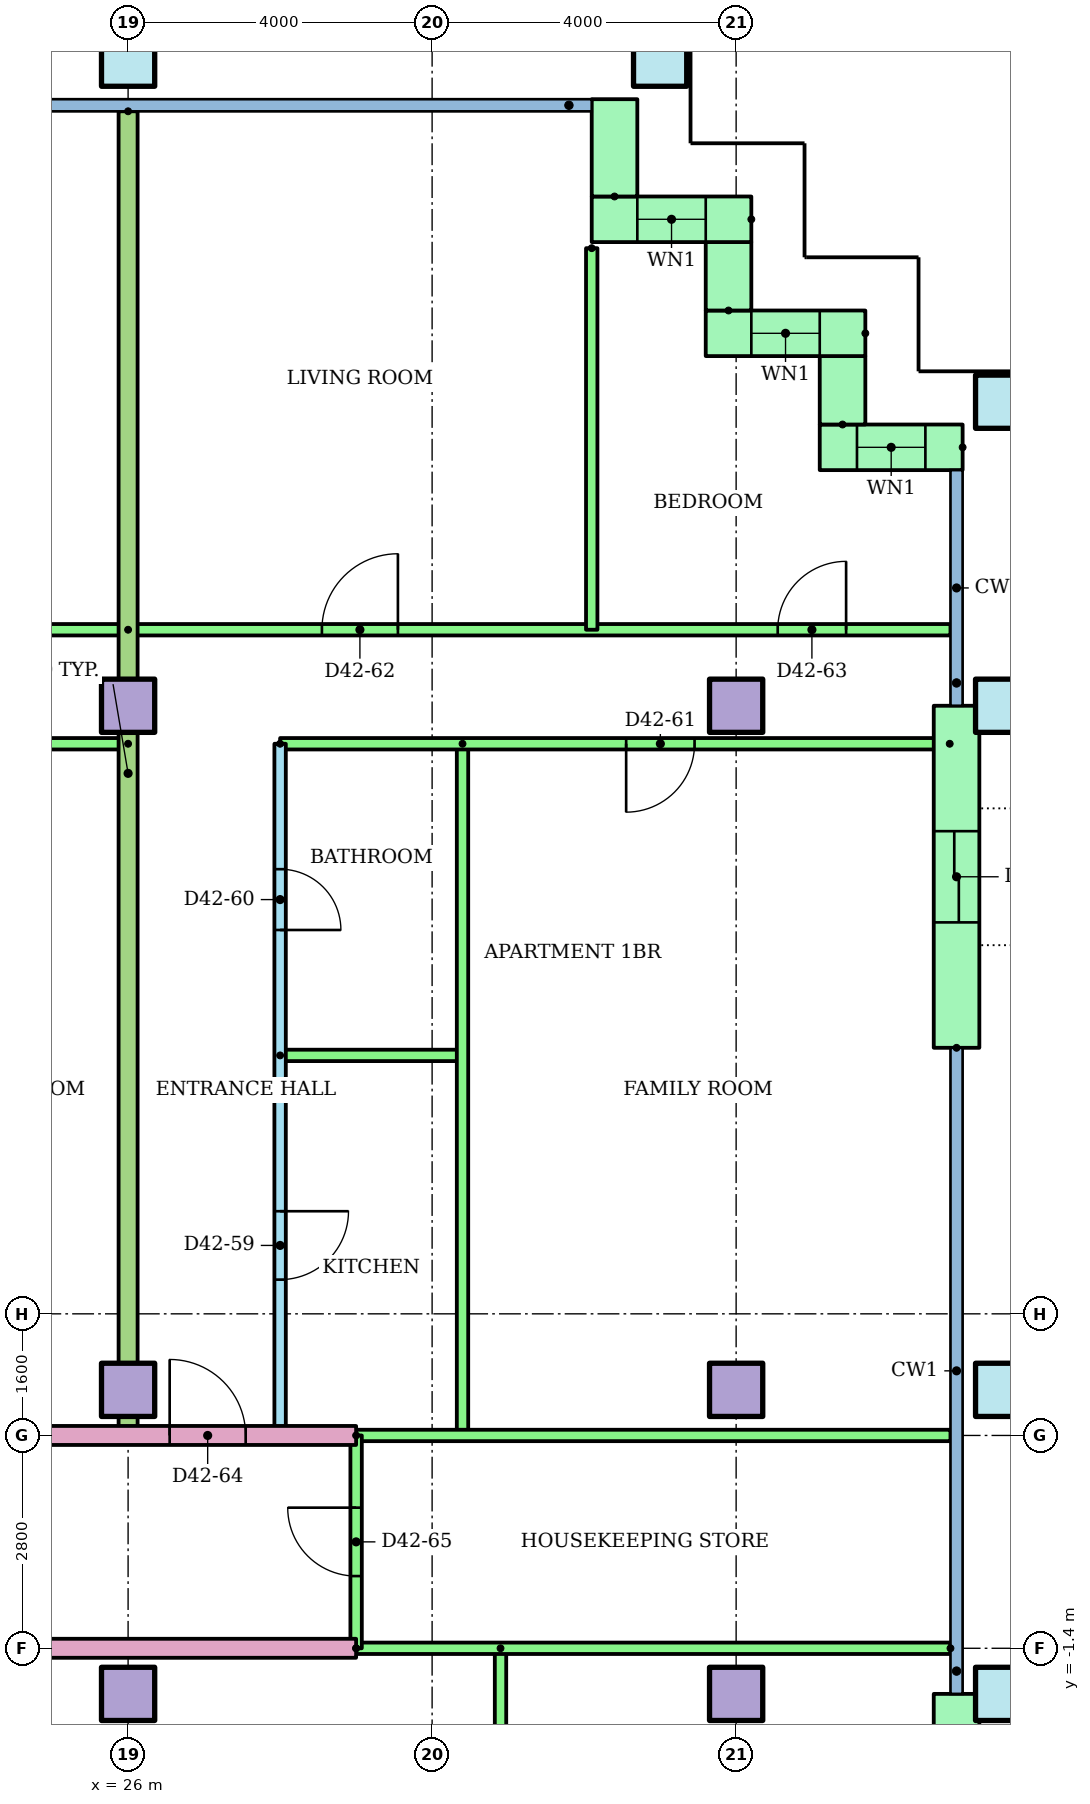
"""IFC4 building model, lengths in metres.
Left out: names, types, materials, properties, quantities, classifications, styles, units other than length and angle.
Written with IfcOpenShell. Run it as: python <this file> out.ifc"""

import sys

from ifc_helpers import new_model, si_unit, direction, frame, frame_2d, origin, origin_2d, place, context, subcontext, project, spatial, rectangle, hollow_rectangle, extrude, element, fill, save


model = new_model("IFC4")
c1 = context("Model", 3, precision=1e-05, world=origin(), true_north=direction((0.0, 1.0)))
c2 = subcontext(c1, "Body", "Model", "MODEL_VIEW")
j1 = project(units=[si_unit("LENGTHUNIT", "METRE"), si_unit("PLANEANGLEUNIT", "RADIAN")], contexts=[c1])
p1 = place(None, origin())
s1 = spatial("IfcSite", under=j1, at=p1, CompositionType="ELEMENT")
p2 = place(p1, origin())
s2 = spatial("IfcBuilding", under=s1, at=p2, CompositionType="ELEMENT")
p3 = place(p2, frame((0.0, 0.0, 165.3)))
s3 = spatial("IfcBuildingStorey", under=s2, at=p3, CompositionType="ELEMENT", Elevation=165.3)
for number, where in (
    (1, (26.0, -2.0, 0.0)),
    (2, (34.0, -2.0, 0.0)),
):
    element("IfcColumn", number, at=place(p3, frame(where)), inside=s3, PredefinedType="COLUMN", context=c2, shape_type="SweptSolid", body=[
        extrude(rectangle(XDim=0.7, YDim=0.7, at=origin_2d()), origin(), (0.0, 0.0, 1.0), 3.2),
    ])
p4 = place(p3, frame((37.5, -2.0, 0.0)))
e3 = element("IfcColumn", 3, at=p4, inside=s3, PredefinedType="COLUMN", context=c2, shape_type="SweptSolid", body=[
    extrude(hollow_rectangle(XDim=0.7, YDim=0.7, WallThickness=0.036, at=origin_2d()), origin(), (0.0, 0.0, 1.0), 3.2),
])
for number, where in (
    (4, (26.0, 2.0, 0.0)),
    (5, (34.0, 2.0, 0.0)),
):
    element("IfcColumn", number, at=place(p3, frame(where)), inside=s3, PredefinedType="COLUMN", context=c2, shape_type="SweptSolid", body=[
        extrude(rectangle(XDim=0.7, YDim=0.7, at=origin_2d()), origin(), (0.0, 0.0, 1.0), 3.2),
    ])
p5 = place(p3, frame((37.5, 2.0, 0.0)))
e6 = element("IfcColumn", 6, at=p5, inside=s3, PredefinedType="COLUMN", context=c2, shape_type="SweptSolid", body=[
    extrude(hollow_rectangle(XDim=0.7, YDim=0.7, WallThickness=0.036, at=origin_2d()), origin(), (0.0, 0.0, 1.0), 3.2),
])
for number, where in (
    (7, (26.0, 11.0, 0.0)),
    (8, (34.0, 11.0, 0.0)),
):
    element("IfcColumn", number, at=place(p3, frame(where)), inside=s3, PredefinedType="COLUMN", context=c2, shape_type="SweptSolid", body=[
        extrude(rectangle(XDim=0.7, YDim=0.7, at=origin_2d()), origin(), (0.0, 0.0, 1.0), 3.2),
    ])
for number, where in (
    (9, (37.5, 11.0, 0.0)),
    (10, (37.5, 15.0, 0.0)),
    (11, (26.0, 19.5, 0.0)),
    (12, (33.0, 19.5, 0.0)),
):
    element("IfcColumn", number, at=place(p3, frame(where)), inside=s3, PredefinedType="COLUMN", context=c2, shape_type="SweptSolid", body=[
        extrude(hollow_rectangle(XDim=0.7, YDim=0.7, WallThickness=0.036, at=origin_2d()), origin(), (0.0, 0.0, 1.0), 3.2),
    ])
p6 = place(p3, frame((36.98, 14.4, 0.0), z_axis=(0.0, 0.0, 1.0), x_axis=(-1.0, 0.0, 0.0)))
e13 = element("IfcWall", 13, at=p6, inside=s3, PredefinedType="STANDARD", context=c2, shape_type="SweptSolid", body=[
    extrude(rectangle(XDim=1.88, YDim=0.6, at=frame_2d((0.94, 0.0))), origin(), (0.0, 0.0, 1.0), 2.92),
])
p7 = place(p6, frame((0.49, 0.0, 0.9)))
e14 = element("IfcOpeningElement", 14, at=p7, cuts=e13, PredefinedType="OPENING", context=c2, shape_type="SweptSolid", body=[
    extrude(rectangle(XDim=0.9, YDim=1.5, at=frame_2d((0.45, 0.75))), frame((0.0, 0.31, 0.0), z_axis=(0.0, -1.0, 0.0), x_axis=(1.0, 0.0, 0.0)), (0.0, 0.0, 1.0), 0.62),
])
p8 = place(p3, frame((35.4, 14.7, 0.0), z_axis=(0.0, 0.0, 1.0), x_axis=(0.0, 1.0, 0.0)))
e15 = element("IfcWall", 15, at=p8, inside=s3, PredefinedType="STANDARD", context=c2, shape_type="SweptSolid", body=[
    extrude(rectangle(XDim=0.9, YDim=0.6, at=frame_2d((0.45, 0.0))), origin(), (0.0, 0.0, 1.0), 2.92),
])
p9 = place(p3, frame((35.7, 15.9, 0.0), z_axis=(0.0, 0.0, 1.0), x_axis=(-1.0, 0.0, 0.0)))
e16 = element("IfcWall", 16, at=p9, inside=s3, PredefinedType="STANDARD", context=c2, shape_type="SweptSolid", body=[
    extrude(rectangle(XDim=2.1, YDim=0.6, at=frame_2d((1.05, 0.0))), origin(), (0.0, 0.0, 1.0), 2.92),
])
p10 = place(p9, frame((0.6, 0.0, 0.9)))
e17 = element("IfcOpeningElement", 17, at=p10, cuts=e16, PredefinedType="OPENING", context=c2, shape_type="SweptSolid", body=[
    extrude(rectangle(XDim=0.9, YDim=1.5, at=frame_2d((0.45, 0.75))), frame((0.0, 0.31, 0.0), z_axis=(0.0, -1.0, 0.0), x_axis=(1.0, 0.0, 0.0)), (0.0, 0.0, 1.0), 0.62),
])
p11 = place(p3, frame((33.9, 16.2, 0.0), z_axis=(0.0, 0.0, 1.0), x_axis=(0.0, 1.0, 0.0)))
e18 = element("IfcWall", 18, at=p11, inside=s3, PredefinedType="STANDARD", context=c2, shape_type="SweptSolid", body=[
    extrude(rectangle(XDim=0.9, YDim=0.6, at=frame_2d((0.45, 0.0))), origin(), (0.0, 0.0, 1.0), 2.92),
])
p12 = place(p3, frame((34.2, 17.4, 0.0), z_axis=(0.0, 0.0, 1.0), x_axis=(-1.0, 0.0, 0.0)))
e19 = element("IfcWall", 19, at=p12, inside=s3, PredefinedType="STANDARD", context=c2, shape_type="SweptSolid", body=[
    extrude(rectangle(XDim=2.1, YDim=0.6, at=frame_2d((1.05, 0.0))), origin(), (0.0, 0.0, 1.0), 2.92),
])
p13 = place(p12, frame((0.6, 0.0, 0.9)))
e20 = element("IfcOpeningElement", 20, at=p13, cuts=e19, PredefinedType="OPENING", context=c2, shape_type="SweptSolid", body=[
    extrude(rectangle(XDim=0.9, YDim=1.5, at=frame_2d((0.45, 0.75))), frame((0.0, 0.31, 0.0), z_axis=(0.0, -1.0, 0.0), x_axis=(1.0, 0.0, 0.0)), (0.0, 0.0, 1.0), 0.62),
])
p14 = place(p3, frame((32.4, 17.7, 0.0), z_axis=(0.0, 0.0, 1.0), x_axis=(0.0, 1.0, 0.0)))
e21 = element("IfcWall", 21, at=p14, inside=s3, PredefinedType="STANDARD", context=c2, shape_type="SweptSolid", body=[
    extrude(rectangle(XDim=1.28, YDim=0.6, at=frame_2d((0.64, 0.0))), origin(), (0.0, 0.0, 1.0), 2.92),
])
p15 = place(p3, frame((36.9, -5.7, 0.0), z_axis=(0.0, 0.0, 1.0), x_axis=(0.0, 1.0, 0.0)))
e22 = element("IfcWall", 22, at=p15, inside=s3, PredefinedType="STANDARD", context=c2, shape_type="SweptSolid", body=[
    extrude(rectangle(XDim=3.7, YDim=0.6, at=frame_2d((1.85, 0.0))), origin(), (0.0, 0.0, 1.0), 2.92),
])
p16 = place(p15, frame((1.25, 0.0, 0.0)))
e23 = element("IfcOpeningElement", 23, at=p16, cuts=e22, PredefinedType="OPENING", context=c2, shape_type="SweptSolid", body=[
    extrude(rectangle(XDim=1.2, YDim=2.1, at=frame_2d((0.6, 1.05))), frame((0.0, 0.31, 0.0), z_axis=(0.0, -1.0, 0.0), x_axis=(1.0, 0.0, 0.0)), (0.0, 0.0, 1.0), 0.62),
])
p17 = place(p3, frame((36.9, 6.5, 0.0), z_axis=(0.0, 0.0, 1.0), x_axis=(0.0, 1.0, 0.0)))
e24 = element("IfcWall", 24, at=p17, inside=s3, PredefinedType="STANDARD", context=c2, shape_type="SweptSolid", body=[
    extrude(rectangle(XDim=4.5, YDim=0.6, at=frame_2d((2.25, 0.0))), origin(), (0.0, 0.0, 1.0), 2.92),
])
p18 = place(p17, frame((1.65, 0.0, 0.0)))
e25 = element("IfcOpeningElement", 25, at=p18, cuts=e24, PredefinedType="OPENING", context=c2, shape_type="SweptSolid", body=[
    extrude(rectangle(XDim=1.2, YDim=2.1, at=frame_2d((0.6, 1.05))), frame((0.0, 0.31, 0.0), z_axis=(0.0, -1.0, 0.0), x_axis=(1.0, 0.0, 0.0)), (0.0, 0.0, 1.0), 0.62),
])
p19 = place(p3, frame((30.9, -1.4, 0.0), z_axis=(0.0, 0.0, 1.0), x_axis=(0.0, -1.0, 0.0)))
e26 = element("IfcWall", 26, at=p19, inside=s3, PredefinedType="PARTITIONING", context=c2, shape_type="SweptSolid", body=[
    extrude(rectangle(XDim=6.7, YDim=0.15, at=frame_2d((3.35, 0.0))), origin(), (0.0, 0.0, 1.0), 2.4),
])
p20 = place(p3, frame((29.0, -1.4, 0.0), z_axis=(0.0, 0.0, 1.0), x_axis=(-1.0, 0.0, 0.0)))
e27 = element("IfcWall", 27, at=p20, inside=s3, PredefinedType="PARTITIONING", context=c2, shape_type="SweptSolid", body=[
    extrude(rectangle(XDim=15.0, YDim=0.25, at=frame_2d((7.5, 0.0))), origin(), (0.0, 0.0, 1.0), 2.4),
])
p21 = place(p3, frame((36.82, -1.4, 0.0), z_axis=(0.0, 0.0, 1.0), x_axis=(-1.0, 0.0, 0.0)))
e28 = element("IfcWall", 28, at=p21, inside=s3, PredefinedType="PARTITIONING", context=c2, shape_type="SweptSolid", body=[
    extrude(rectangle(XDim=7.82, YDim=0.15, at=frame_2d((3.91, 0.0))), origin(), (0.0, 0.0, 1.0), 2.4),
])
p22 = place(p3, frame((26.0, 10.5, 0.0), z_axis=(0.0, 0.0, 1.0), x_axis=(-1.0, 0.0, 0.0)))
e29 = element("IfcWall", 29, at=p22, inside=s3, PredefinedType="PARTITIONING", context=c2, shape_type="SweptSolid", body=[
    extrude(rectangle(XDim=10.0, YDim=0.15, at=frame_2d((5.0, 0.0))), origin(), (0.0, 0.0, 1.0), 2.4),
])
p23 = place(p22, frame((4.9, 0.0, 0.0)))
e30 = element("IfcOpeningElement", 30, at=p23, cuts=e29, PredefinedType="OPENING", context=c2, shape_type="SweptSolid", body=[
    extrude(rectangle(XDim=0.9, YDim=2.1, at=frame_2d((0.45, 1.05))), frame((0.0, 0.085, 0.0), z_axis=(0.0, -1.0, 0.0), x_axis=(1.0, 0.0, 0.0)), (0.0, 0.0, 1.0), 0.17),
])
p24 = place(p22, frame((1.1, 0.0, 0.0)))
e31 = element("IfcOpeningElement", 31, at=p24, cuts=e29, PredefinedType="OPENING", context=c2, shape_type="SweptSolid", body=[
    extrude(rectangle(XDim=0.9, YDim=2.1, at=frame_2d((0.45, 1.05))), frame((0.0, 0.085, 0.0), z_axis=(0.0, -1.0, 0.0), x_axis=(1.0, 0.0, 0.0)), (0.0, 0.0, 1.0), 0.17),
])
p25 = place(p3, frame((14.0, 12.0, 0.0)))
e32 = element("IfcWall", 32, at=p25, inside=s3, PredefinedType="PARTITIONING", context=c2, shape_type="SweptSolid", body=[
    extrude(rectangle(XDim=12.0, YDim=0.15, at=frame_2d((6.0, 0.0))), origin(), (0.0, 0.0, 1.0), 2.4),
])
p26 = place(p25, frame((1.5, 0.0, 0.0)))
e33 = element("IfcOpeningElement", 33, at=p26, cuts=e32, PredefinedType="OPENING", context=c2, shape_type="SweptSolid", body=[
    extrude(rectangle(XDim=1.0, YDim=2.1, at=frame_2d((0.5, 1.05))), frame((0.0, 0.085, 0.0), z_axis=(0.0, -1.0, 0.0), x_axis=(1.0, 0.0, 0.0)), (0.0, 0.0, 1.0), 0.17),
])
p27 = place(p25, frame((7.55, 0.0, 0.0)))
e34 = element("IfcOpeningElement", 34, at=p27, cuts=e32, PredefinedType="OPENING", context=c2, shape_type="SweptSolid", body=[
    extrude(rectangle(XDim=0.9, YDim=2.1, at=frame_2d((0.45, 1.05))), frame((0.0, 0.085, 0.0), z_axis=(0.0, -1.0, 0.0), x_axis=(1.0, 0.0, 0.0)), (0.0, 0.0, 1.0), 0.17),
])
p28 = place(p3, frame((28.0, 10.5, 0.0), z_axis=(0.0, 0.0, 1.0), x_axis=(0.0, -1.0, 0.0)))
e35 = element("IfcWall", 35, at=p28, inside=s3, PredefinedType="PARTITIONING", context=c2, shape_type="SweptSolid", body=[
    extrude(rectangle(XDim=9.1, YDim=0.15, at=frame_2d((4.55, 0.0))), origin(), (0.0, 0.0, 1.0), 2.4),
])
p29 = place(p28, frame((6.15, 0.0, 0.0)))
e36 = element("IfcOpeningElement", 36, at=p29, cuts=e35, PredefinedType="OPENING", context=c2, shape_type="SweptSolid", body=[
    extrude(rectangle(XDim=0.9, YDim=2.1, at=frame_2d((0.45, 1.05))), frame((0.0, 0.085, 0.0), z_axis=(0.0, -1.0, 0.0), x_axis=(1.0, 0.0, 0.0)), (0.0, 0.0, 1.0), 0.17),
])
p30 = place(p28, frame((1.65, 0.0, 0.0)))
e37 = element("IfcOpeningElement", 37, at=p30, cuts=e35, PredefinedType="OPENING", context=c2, shape_type="SweptSolid", body=[
    extrude(rectangle(XDim=0.8, YDim=2.1, at=frame_2d((0.4, 1.05))), frame((0.0, 0.085, 0.0), z_axis=(0.0, -1.0, 0.0), x_axis=(1.0, 0.0, 0.0)), (0.0, 0.0, 1.0), 0.17),
])
p31 = place(p3, frame((28.0, 6.4, 0.0)))
e38 = element("IfcWall", 38, at=p31, inside=s3, PredefinedType="PARTITIONING", context=c2, shape_type="SweptSolid", body=[
    extrude(rectangle(XDim=2.4, YDim=0.15, at=frame_2d((1.2, 0.0))), origin(), (0.0, 0.0, 1.0), 2.4),
])
p32 = place(p3, frame((30.4, 10.5, 0.0), z_axis=(0.0, 0.0, 1.0), x_axis=(0.0, -1.0, 0.0)))
e39 = element("IfcWall", 39, at=p32, inside=s3, PredefinedType="PARTITIONING", context=c2, shape_type="SweptSolid", body=[
    extrude(rectangle(XDim=9.1, YDim=0.15, at=frame_2d((4.55, 0.0))), origin(), (0.0, 0.0, 1.0), 2.4),
])
p33 = place(p3, frame((36.81, 10.5, 0.0), z_axis=(0.0, 0.0, 1.0), x_axis=(-1.0, 0.0, 0.0)))
e40 = element("IfcWall", 40, at=p33, inside=s3, PredefinedType="PARTITIONING", context=c2, shape_type="SweptSolid", body=[
    extrude(rectangle(XDim=8.81, YDim=0.15, at=frame_2d((4.405, 0.0))), origin(), (0.0, 0.0, 1.0), 2.4),
])
p34 = place(p33, frame((3.357, 0.0, 0.0)))
e41 = element("IfcOpeningElement", 41, at=p34, cuts=e40, PredefinedType="OPENING", context=c2, shape_type="SweptSolid", body=[
    extrude(rectangle(XDim=0.9, YDim=2.1, at=frame_2d((0.45, 1.05))), frame((0.0, 0.085, 0.0), z_axis=(0.0, -1.0, 0.0), x_axis=(1.0, 0.0, 0.0)), (0.0, 0.0, 1.0), 0.17),
])
p35 = place(p3, frame((26.0, 12.0, 0.0)))
e42 = element("IfcWall", 42, at=p35, inside=s3, PredefinedType="PARTITIONING", context=c2, shape_type="SweptSolid", body=[
    extrude(rectangle(XDim=10.82, YDim=0.15, at=frame_2d((5.41, 0.0))), origin(), (0.0, 0.0, 1.0), 2.4),
])
p36 = place(p35, frame((2.55, 0.0, 0.0)))
e43 = element("IfcOpeningElement", 43, at=p36, cuts=e42, PredefinedType="OPENING", context=c2, shape_type="SweptSolid", body=[
    extrude(rectangle(XDim=1.0, YDim=2.1, at=frame_2d((0.5, 1.05))), frame((0.0, 0.085, 0.0), z_axis=(0.0, -1.0, 0.0), x_axis=(1.0, 0.0, 0.0)), (0.0, 0.0, 1.0), 0.17),
])
p37 = place(p35, frame((8.547, 0.0, 0.0)))
e44 = element("IfcOpeningElement", 44, at=p37, cuts=e42, PredefinedType="OPENING", context=c2, shape_type="SweptSolid", body=[
    extrude(rectangle(XDim=0.9, YDim=2.1, at=frame_2d((0.45, 1.05))), frame((0.0, 0.085, 0.0), z_axis=(0.0, -1.0, 0.0), x_axis=(1.0, 0.0, 0.0)), (0.0, 0.0, 1.0), 0.17),
])
p38 = place(p3, frame((32.1, 17.02, 0.0), z_axis=(0.0, 0.0, 1.0), x_axis=(0.0, -1.0, 0.0)))
e45 = element("IfcWall", 45, at=p38, inside=s3, PredefinedType="PARTITIONING", context=c2, shape_type="SweptSolid", body=[
    extrude(rectangle(XDim=5.02, YDim=0.15, at=frame_2d((2.51, 0.0))), origin(), (0.0, 0.0, 1.0), 2.4),
])
p39 = place(p3, frame((26.0, 18.821, 0.0), z_axis=(0.0, 0.0, 1.0), x_axis=(0.0, -1.0, 0.0)))
e46 = element("IfcWall", 46, at=p39, inside=s3, PredefinedType="PARTITIONING", context=c2, shape_type="SweptSolid", body=[
    extrude(rectangle(XDim=17.421, YDim=0.25, at=frame_2d((8.71, 0.0))), origin(), (0.0, 0.0, 1.0), 2.4),
])
p40 = place(p3, frame((14.0, 1.4, 0.0)))
e47 = element("IfcWall", 47, at=p40, inside=s3, PredefinedType="PARTITIONING", context=c2, shape_type="SweptSolid", body=[
    extrude(rectangle(XDim=15.0, YDim=0.25, at=frame_2d((7.5, 0.0))), origin(), (0.0, 0.0, 1.0), 2.4),
])
p41 = place(p40, frame((0.5, 0.0, 0.0)))
e48 = element("IfcOpeningElement", 48, at=p41, cuts=e47, PredefinedType="OPENING", context=c2, shape_type="SweptSolid", body=[
    extrude(rectangle(XDim=1.0, YDim=2.1, at=frame_2d((0.5, 1.05))), frame((0.0, 0.135, 0.0), z_axis=(0.0, -1.0, 0.0), x_axis=(1.0, 0.0, 0.0)), (0.0, 0.0, 1.0), 0.27),
])
p42 = place(p40, frame((12.547, 0.0, 0.0)))
e49 = element("IfcOpeningElement", 49, at=p42, cuts=e47, PredefinedType="OPENING", context=c2, shape_type="SweptSolid", body=[
    extrude(rectangle(XDim=1.0, YDim=2.1, at=frame_2d((0.5, 1.05))), frame((0.0, 0.135, 0.0), z_axis=(0.0, -1.0, 0.0), x_axis=(1.0, 0.0, 0.0)), (0.0, 0.0, 1.0), 0.27),
])
p43 = place(p3, frame((29.0, 1.4, 0.0)))
e50 = element("IfcWall", 50, at=p43, inside=s3, PredefinedType="PARTITIONING", context=c2, shape_type="SweptSolid", body=[
    extrude(rectangle(XDim=7.82, YDim=0.15, at=frame_2d((3.91, 0.0))), origin(), (0.0, 0.0, 1.0), 2.4),
])
p44 = place(p3, frame((29.0, -1.4, 0.0), z_axis=(0.0, 0.0, 1.0), x_axis=(0.0, 1.0, 0.0)))
e51 = element("IfcWall", 51, at=p44, inside=s3, PredefinedType="PARTITIONING", context=c2, shape_type="SweptSolid", body=[
    extrude(rectangle(XDim=2.8, YDim=0.15, at=frame_2d((1.4, 0.0))), origin(), (0.0, 0.0, 1.0), 2.4),
])
p45 = place(p44, frame((0.95, 0.0, 0.0)))
e52 = element("IfcOpeningElement", 52, at=p45, cuts=e51, PredefinedType="OPENING", context=c2, shape_type="SweptSolid", body=[
    extrude(rectangle(XDim=0.9, YDim=2.1, at=frame_2d((0.45, 1.05))), frame((0.0, 0.085, 0.0), z_axis=(0.0, -1.0, 0.0), x_axis=(1.0, 0.0, 0.0)), (0.0, 0.0, 1.0), 0.17),
])
p46 = place(p7, origin())
e53 = element("IfcWindow", 53, at=p46, inside=s3, PartitioningType="SINGLE_PANEL", PredefinedType="WINDOW", context=c2, shape_type="SweptSolid", body=[
    extrude(rectangle(XDim=0.9, YDim=1.5, at=frame_2d((0.45, 0.75))), frame((0.0, 0.03, 0.0), z_axis=(0.0, -1.0, 0.0), x_axis=(1.0, 0.0, 0.0)), (0.0, 0.0, 1.0), 0.06),
])
fill(e14, e53)
p47 = place(p10, origin())
e54 = element("IfcWindow", 54, at=p47, inside=s3, PartitioningType="SINGLE_PANEL", PredefinedType="WINDOW", context=c2, shape_type="SweptSolid", body=[
    extrude(rectangle(XDim=0.9, YDim=1.5, at=frame_2d((0.45, 0.75))), frame((0.0, 0.03, 0.0), z_axis=(0.0, -1.0, 0.0), x_axis=(1.0, 0.0, 0.0)), (0.0, 0.0, 1.0), 0.06),
])
fill(e17, e54)
p48 = place(p13, origin())
e55 = element("IfcWindow", 55, at=p48, inside=s3, PartitioningType="SINGLE_PANEL", PredefinedType="WINDOW", context=c2, shape_type="SweptSolid", body=[
    extrude(rectangle(XDim=0.9, YDim=1.5, at=frame_2d((0.45, 0.75))), frame((0.0, 0.03, 0.0), z_axis=(0.0, -1.0, 0.0), x_axis=(1.0, 0.0, 0.0)), (0.0, 0.0, 1.0), 0.06),
])
fill(e20, e55)
p49 = place(p29, origin())
e56 = element("IfcDoor", 56, at=p49, inside=s3, OperationType="SINGLE_SWING_LEFT", PredefinedType="DOOR", context=c2, shape_type="SweptSolid", body=[
    extrude(rectangle(XDim=0.9, YDim=2.1, at=frame_2d((0.45, 1.05))), frame((0.0, 0.025, 0.0), z_axis=(0.0, -1.0, 0.0), x_axis=(1.0, 0.0, 0.0)), (0.0, 0.0, 1.0), 0.05),
])
fill(e36, e56)
p50 = place(p30, origin())
e57 = element("IfcDoor", 57, at=p50, inside=s3, OperationType="SINGLE_SWING_RIGHT", PredefinedType="DOOR", context=c2, shape_type="SweptSolid", body=[
    extrude(rectangle(XDim=0.8, YDim=2.1, at=frame_2d((0.4, 1.05))), frame((0.0, 0.025, 0.0), z_axis=(0.0, -1.0, 0.0), x_axis=(1.0, 0.0, 0.0)), (0.0, 0.0, 1.0), 0.05),
])
fill(e37, e57)
p51 = place(p34, origin())
e58 = element("IfcDoor", 58, at=p51, inside=s3, OperationType="SINGLE_SWING_RIGHT", PredefinedType="DOOR", context=c2, shape_type="SweptSolid", body=[
    extrude(rectangle(XDim=0.9, YDim=2.1, at=frame_2d((0.45, 1.05))), frame((0.0, 0.025, 0.0), z_axis=(0.0, -1.0, 0.0), x_axis=(1.0, 0.0, 0.0)), (0.0, 0.0, 1.0), 0.05),
])
fill(e41, e58)
p52 = place(p36, origin())
e59 = element("IfcDoor", 59, at=p52, inside=s3, OperationType="SINGLE_SWING_RIGHT", PredefinedType="DOOR", context=c2, shape_type="SweptSolid", body=[
    extrude(rectangle(XDim=1.0, YDim=2.1, at=frame_2d((0.5, 1.05))), frame((0.0, 0.025, 0.0), z_axis=(0.0, -1.0, 0.0), x_axis=(1.0, 0.0, 0.0)), (0.0, 0.0, 1.0), 0.05),
])
fill(e43, e59)
p53 = place(p37, origin())
e60 = element("IfcDoor", 60, at=p53, inside=s3, OperationType="SINGLE_SWING_RIGHT", PredefinedType="DOOR", context=c2, shape_type="SweptSolid", body=[
    extrude(rectangle(XDim=0.9, YDim=2.1, at=frame_2d((0.45, 1.05))), frame((0.0, 0.025, 0.0), z_axis=(0.0, -1.0, 0.0), x_axis=(1.0, 0.0, 0.0)), (0.0, 0.0, 1.0), 0.05),
])
fill(e44, e60)
p54 = place(p42, origin())
e61 = element("IfcDoor", 61, at=p54, inside=s3, OperationType="SINGLE_SWING_LEFT", PredefinedType="DOOR", context=c2, shape_type="SweptSolid", body=[
    extrude(rectangle(XDim=1.0, YDim=2.1, at=frame_2d((0.5, 1.05))), frame((0.0, 0.025, 0.0), z_axis=(0.0, -1.0, 0.0), x_axis=(1.0, 0.0, 0.0)), (0.0, 0.0, 1.0), 0.05),
])
fill(e49, e61)
p55 = place(p45, origin())
e62 = element("IfcDoor", 62, at=p55, inside=s3, OperationType="SINGLE_SWING_RIGHT", PredefinedType="DOOR", context=c2, shape_type="SweptSolid", body=[
    extrude(rectangle(XDim=0.9, YDim=2.1, at=frame_2d((0.45, 1.05))), frame((0.0, 0.025, 0.0), z_axis=(0.0, -1.0, 0.0), x_axis=(1.0, 0.0, 0.0)), (0.0, 0.0, 1.0), 0.05),
])
fill(e52, e62)
p56 = place(p18, origin())
e63 = element("IfcDoor", 63, at=p56, inside=s3, OperationType="SLIDING_TO_LEFT", PredefinedType="DOOR", context=c2, shape_type="SweptSolid", body=[
    extrude(rectangle(XDim=1.2, YDim=2.1, at=frame_2d((0.6, 1.05))), frame((0.0, 0.025, 0.0), z_axis=(0.0, -1.0, 0.0), x_axis=(1.0, 0.0, 0.0)), (0.0, 0.0, 1.0), 0.05),
])
fill(e25, e63)
save(model, sys.argv[1])
